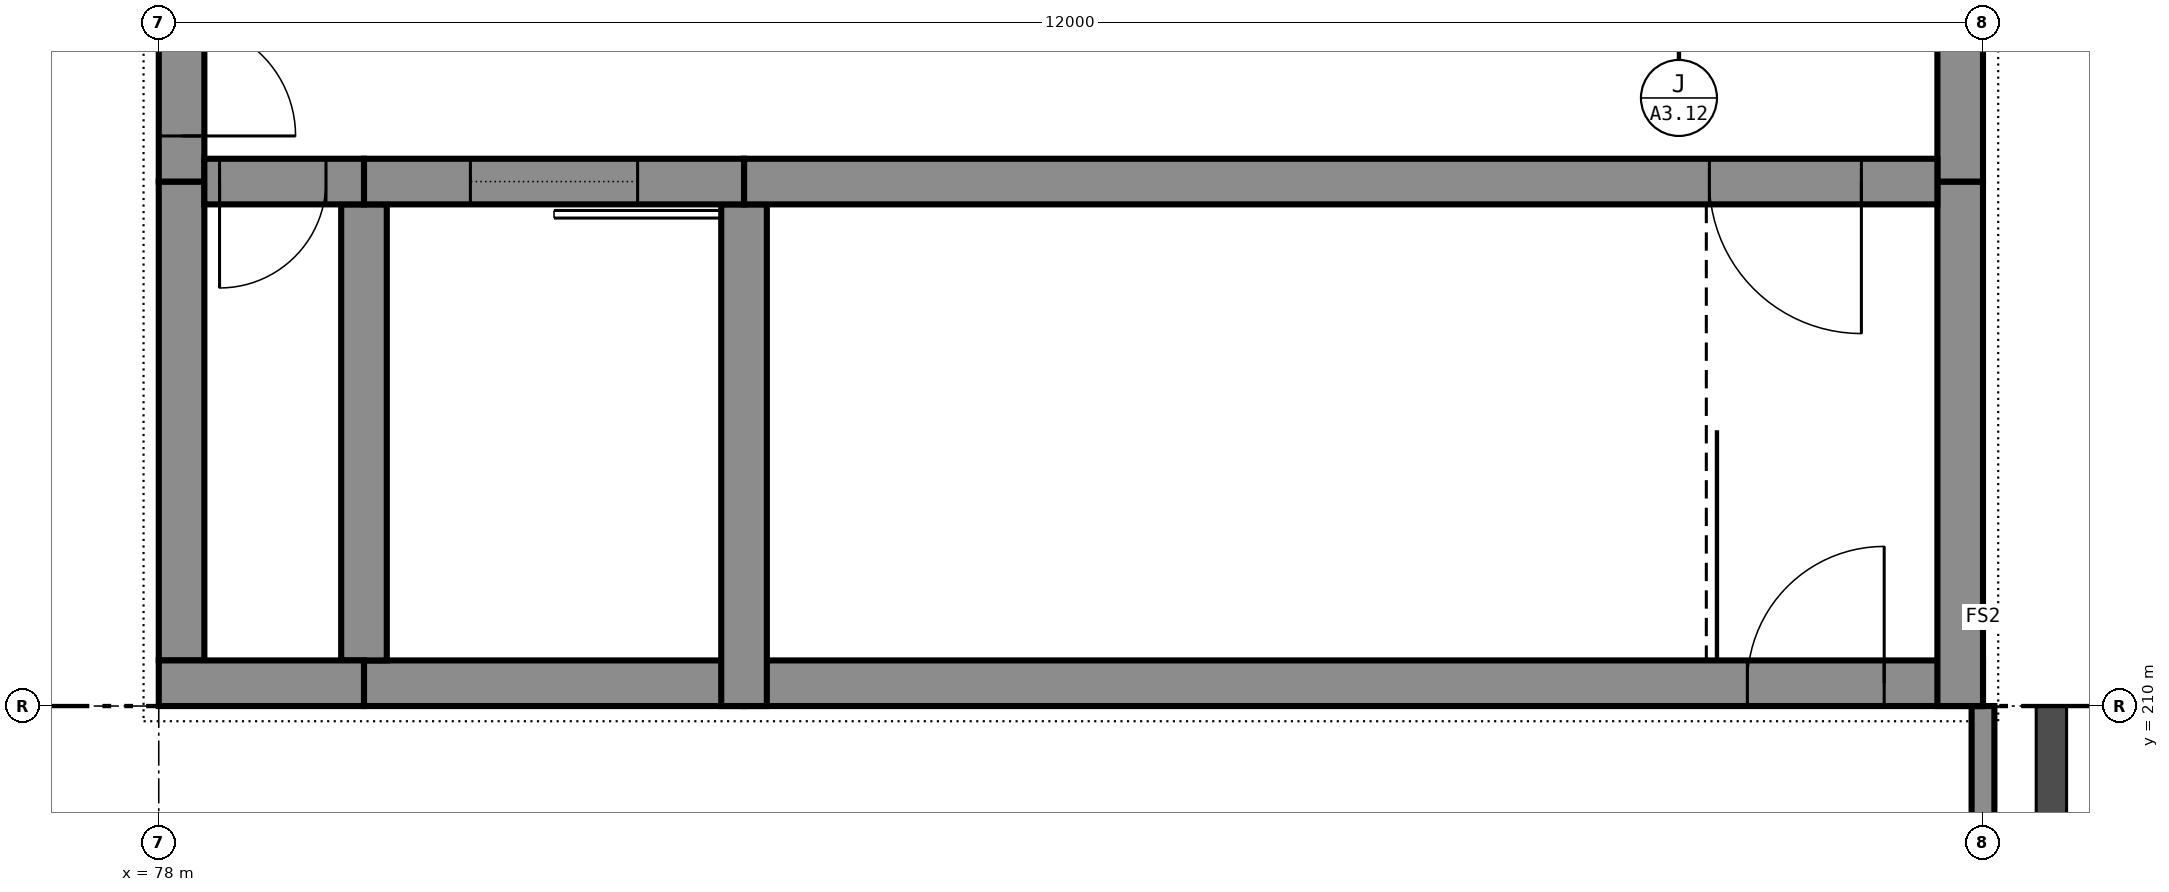
"""IFC4 building model, lengths in metres.
Left out: names, types, materials, properties, quantities, classifications, styles, units other than length and angle.
Written with IfcOpenShell. Run it as: python <this file> out.ifc"""

import sys

from ifc_helpers import new_model, si_unit, direction, frame, frame_2d, origin, place, context, subcontext, project, spatial, rectangle, extrude, element, fill, save


model = new_model("IFC4")
c1 = context("Model", 3, precision=1e-05, world=origin(), true_north=direction((0.0, 1.0)))
c2 = subcontext(c1, "Body", "Model", "MODEL_VIEW")
j1 = project(units=[si_unit("LENGTHUNIT", "METRE"), si_unit("PLANEANGLEUNIT", "RADIAN")], contexts=[c1])
p1 = place(None, origin())
s1 = spatial("IfcSite", under=j1, at=p1, CompositionType="ELEMENT")
p2 = place(p1, origin())
s2 = spatial("IfcBuilding", under=s1, at=p2, CompositionType="ELEMENT")
p3 = place(p2, frame((0.0, 0.0, 12.0)))
s3 = spatial("IfcBuildingStorey", under=s2, at=p3, CompositionType="ELEMENT", Elevation=12.0)
p4 = place(p3, frame((90.0, 210.15, 0.0), z_axis=(0.0, 0.0, 1.0), x_axis=(-1.0, 0.0, 0.0)))
e1 = element("IfcWall", 1, at=p4, inside=s3, PredefinedType="SHEAR", context=c2, shape_type="SweptSolid", body=[
    extrude(rectangle(XDim=8.15, YDim=0.3, at=frame_2d((4.075, 0.0))), origin(), (0.0, 0.0, 1.0), 5.0),
])
p5 = place(p4, frame((0.65, 0.0, 0.0)))
e2 = element("IfcOpeningElement", 2, at=p5, cuts=e1, PredefinedType="OPENING", context=c2, shape_type="SweptSolid", body=[
    extrude(rectangle(XDim=0.9, YDim=2.1, at=frame_2d((0.45, 1.05))), frame((0.0, 0.16, 0.0), z_axis=(0.0, -1.0, 0.0), x_axis=(1.0, 0.0, 0.0)), (0.0, 0.0, 1.0), 0.32),
])
p6 = place(p3, frame((81.85, 210.15, 0.0), z_axis=(0.0, 0.0, 1.0), x_axis=(-1.0, 0.0, 0.0)))
e3 = element("IfcWall", 3, at=p6, inside=s3, PredefinedType="SHEAR", context=c2, shape_type="SweptSolid", body=[
    extrude(rectangle(XDim=2.5, YDim=0.3, at=frame_2d((1.25, 0.0))), origin(), (0.0, 0.0, 1.0), 5.0),
])
p7 = place(p3, frame((79.35, 210.15, 0.0), z_axis=(0.0, 0.0, 1.0), x_axis=(-1.0, 0.0, 0.0)))
e4 = element("IfcWall", 4, at=p7, inside=s3, PredefinedType="SHEAR", context=c2, shape_type="SweptSolid", body=[
    extrude(rectangle(XDim=1.35, YDim=0.3, at=frame_2d((0.675, 0.0))), origin(), (0.0, 0.0, 1.0), 5.0),
])
p8 = place(p3, frame((89.7, 213.45, 0.0), z_axis=(0.0, 0.0, 1.0), x_axis=(-1.0, 0.0, 0.0)))
e5 = element("IfcWall", 5, at=p8, inside=s3, PredefinedType="SHEAR", context=c2, shape_type="SweptSolid", body=[
    extrude(rectangle(XDim=7.85, YDim=0.3, at=frame_2d((3.925, 0.0))), origin(), (0.0, 0.0, 1.0), 5.0),
])
p9 = place(p8, frame((0.5, 0.0, 0.0)))
e6 = element("IfcOpeningElement", 6, at=p9, cuts=e5, PredefinedType="OPENING", context=c2, shape_type="SweptSolid", body=[
    extrude(rectangle(XDim=1.0, YDim=2.1, at=frame_2d((0.5, 1.05))), frame((0.0, 0.16, 0.0), z_axis=(0.0, -1.0, 0.0), x_axis=(1.0, 0.0, 0.0)), (0.0, 0.0, 1.0), 0.32),
])
p10 = place(p3, frame((81.85, 213.45, 0.0), z_axis=(0.0, 0.0, 1.0), x_axis=(-1.0, 0.0, 0.0)))
e7 = element("IfcWall", 7, at=p10, inside=s3, PredefinedType="SHEAR", context=c2, shape_type="SweptSolid", body=[
    extrude(rectangle(XDim=2.5, YDim=0.3, at=frame_2d((1.25, 0.0))), origin(), (0.0, 0.0, 1.0), 5.0),
])
p11 = place(p10, frame((0.7, 0.0, 0.0)))
e8 = element("IfcOpeningElement", 8, at=p11, cuts=e7, PredefinedType="OPENING", context=c2, shape_type="SweptSolid", body=[
    extrude(rectangle(XDim=1.1, YDim=2.1, at=frame_2d((0.55, 1.05))), frame((0.0, 0.16, 0.0), z_axis=(0.0, -1.0, 0.0), x_axis=(1.0, 0.0, 0.0)), (0.0, 0.0, 1.0), 0.32),
])
p12 = place(p3, frame((79.35, 213.45, 0.0), z_axis=(0.0, 0.0, 1.0), x_axis=(-1.0, 0.0, 0.0)))
e9 = element("IfcWall", 9, at=p12, inside=s3, PredefinedType="SHEAR", context=c2, shape_type="SweptSolid", body=[
    extrude(rectangle(XDim=1.05, YDim=0.3, at=frame_2d((0.525, 0.0))), origin(), (0.0, 0.0, 1.0), 5.0),
])
p13 = place(p12, frame((0.25, 0.0, 0.0)))
e10 = element("IfcOpeningElement", 10, at=p13, cuts=e9, PredefinedType="OPENING", context=c2, shape_type="SweptSolid", body=[
    extrude(rectangle(XDim=0.7, YDim=2.1, at=frame_2d((0.35, 1.05))), frame((0.0, 0.16, 0.0), z_axis=(0.0, -1.0, 0.0), x_axis=(1.0, 0.0, 0.0)), (0.0, 0.0, 1.0), 0.32),
])
p14 = place(p3, frame((89.85, 210.0, 0.0), z_axis=(0.0, 0.0, 1.0), x_axis=(0.0, 1.0, 0.0)))
e11 = element("IfcWall", 11, at=p14, inside=s3, PredefinedType="SHEAR", context=c2, shape_type="SweptSolid", body=[
    extrude(rectangle(XDim=3.45, YDim=0.3, at=frame_2d((1.725, 0.0))), origin(), (0.0, 0.0, 1.0), 5.0),
])
p15 = place(p3, frame((89.85, 213.45, 0.0), z_axis=(0.0, 0.0, 1.0), x_axis=(0.0, 1.0, 0.0)))
e12 = element("IfcWall", 12, at=p15, inside=s3, PredefinedType="SHEAR", context=c2, shape_type="SweptSolid", body=[
    extrude(rectangle(XDim=5.1, YDim=0.3, at=frame_2d((2.55, 0.0))), origin(), (0.0, 0.0, 1.0), 5.0),
])
p16 = place(p3, frame((78.15, 210.3, 0.0), z_axis=(0.0, 0.0, 1.0), x_axis=(0.0, 1.0, 0.0)))
e13 = element("IfcWall", 13, at=p16, inside=s3, PredefinedType="SHEAR", context=c2, shape_type="SweptSolid", body=[
    extrude(rectangle(XDim=3.15, YDim=0.3, at=frame_2d((1.575, 0.0))), origin(), (0.0, 0.0, 1.0), 5.0),
])
p17 = place(p3, frame((78.15, 213.45, 0.0), z_axis=(0.0, 0.0, 1.0), x_axis=(0.0, 1.0, 0.0)))
e14 = element("IfcWall", 14, at=p17, inside=s3, PredefinedType="SHEAR", context=c2, shape_type="SweptSolid", body=[
    extrude(rectangle(XDim=5.1, YDim=0.3, at=frame_2d((2.55, 0.0))), origin(), (0.0, 0.0, 1.0), 5.0),
])
p18 = place(p17, frame((0.3, 0.0, 0.0)))
e15 = element("IfcOpeningElement", 15, at=p18, cuts=e14, PredefinedType="OPENING", context=c2, shape_type="SweptSolid", body=[
    extrude(rectangle(XDim=1.5, YDim=2.1, at=frame_2d((0.75, 1.05))), frame((0.0, 0.16, 0.0), z_axis=(0.0, -1.0, 0.0), x_axis=(1.0, 0.0, 0.0)), (0.0, 0.0, 1.0), 0.32),
])
p19 = place(p3, frame((81.85, 210.0, 0.0), z_axis=(0.0, 0.0, 1.0), x_axis=(0.0, 1.0, 0.0)))
e16 = element("IfcWall", 16, at=p19, inside=s3, PredefinedType="SHEAR", context=c2, shape_type="SweptSolid", body=[
    extrude(rectangle(XDim=3.3, YDim=0.3, at=frame_2d((1.65, 0.0))), origin(), (0.0, 0.0, 1.0), 5.0),
])
p20 = place(p3, frame((79.35, 210.3, 0.0), z_axis=(0.0, 0.0, 1.0), x_axis=(0.0, 1.0, 0.0)))
e17 = element("IfcWall", 17, at=p20, inside=s3, PredefinedType="SHEAR", context=c2, shape_type="SweptSolid", body=[
    extrude(rectangle(XDim=3.0, YDim=0.3, at=frame_2d((1.5, 0.0))), origin(), (0.0, 0.0, 1.0), 5.0),
])
p21 = place(p3, frame((90.0, 198.075, 0.0), z_axis=(0.0, 0.0, 1.0), x_axis=(0.0, 1.0, 0.0)))
e18 = element("IfcWall", 18, at=p21, inside=s3, PredefinedType="PARTITIONING", context=c2, shape_type="SweptSolid", body=[
    extrude(rectangle(XDim=11.925, YDim=0.15, at=frame_2d((5.962, 0.0))), origin(), (0.0, 0.0, 1.0), 4.825),
])
p22 = place(p5, frame((0.9, 0.0, 0.0), z_axis=(0.0, 0.0, 1.0), x_axis=(-1.0, 0.0, 0.0)))
e19 = element("IfcDoor", 19, at=p22, inside=s3, OperationType="SINGLE_SWING_LEFT", PredefinedType="DOOR", context=c2, shape_type="SweptSolid", body=[
    extrude(rectangle(XDim=0.9, YDim=2.1, at=frame_2d((0.45, 1.05))), frame((0.0, 0.025, 0.0), z_axis=(0.0, -1.0, 0.0), x_axis=(1.0, 0.0, 0.0)), (0.0, 0.0, 1.0), 0.05),
])
fill(e2, e19)
p23 = place(p13, origin())
e20 = element("IfcDoor", 20, at=p23, inside=s3, OperationType="SINGLE_SWING_LEFT", PredefinedType="DOOR", context=c2, shape_type="SweptSolid", body=[
    extrude(rectangle(XDim=0.7, YDim=2.1, at=frame_2d((0.35, 1.05))), frame((0.0, 0.025, 0.0), z_axis=(0.0, -1.0, 0.0), x_axis=(1.0, 0.0, 0.0)), (0.0, 0.0, 1.0), 0.05),
])
fill(e10, e20)
p24 = place(p11, origin())
e21 = element("IfcDoor", 21, at=p24, inside=s3, OperationType="SLIDING_TO_LEFT", PredefinedType="DOOR", context=c2, shape_type="SweptSolid", body=[
    extrude(rectangle(XDim=1.1, YDim=2.1, at=frame_2d((0.55, 1.05))), frame((0.0, 0.025, 0.0), z_axis=(0.0, -1.0, 0.0), x_axis=(1.0, 0.0, 0.0)), (0.0, 0.0, 1.0), 0.05),
])
fill(e8, e21)
p25 = place(p9, origin())
e22 = element("IfcDoor", 22, at=p25, inside=s3, OperationType="SINGLE_SWING_RIGHT", PredefinedType="DOOR", context=c2, shape_type="SweptSolid", body=[
    extrude(rectangle(XDim=1.0, YDim=2.1, at=frame_2d((0.5, 1.05))), frame((0.0, 0.025, 0.0), z_axis=(0.0, -1.0, 0.0), x_axis=(1.0, 0.0, 0.0)), (0.0, 0.0, 1.0), 0.05),
])
fill(e6, e22)
p26 = place(p18, frame((1.5, 0.0, 0.0), z_axis=(0.0, 0.0, 1.0), x_axis=(-1.0, 0.0, 0.0)))
e23 = element("IfcDoor", 23, at=p26, inside=s3, OperationType="DOUBLE_DOOR_SINGLE_SWING", PredefinedType="DOOR", context=c2, shape_type="SweptSolid", body=[
    extrude(rectangle(XDim=1.5, YDim=2.1, at=frame_2d((0.75, 1.05))), frame((0.0, 0.025, 0.0), z_axis=(0.0, -1.0, 0.0), x_axis=(1.0, 0.0, 0.0)), (0.0, 0.0, 1.0), 0.05),
])
fill(e15, e23)
save(model, sys.argv[1])
